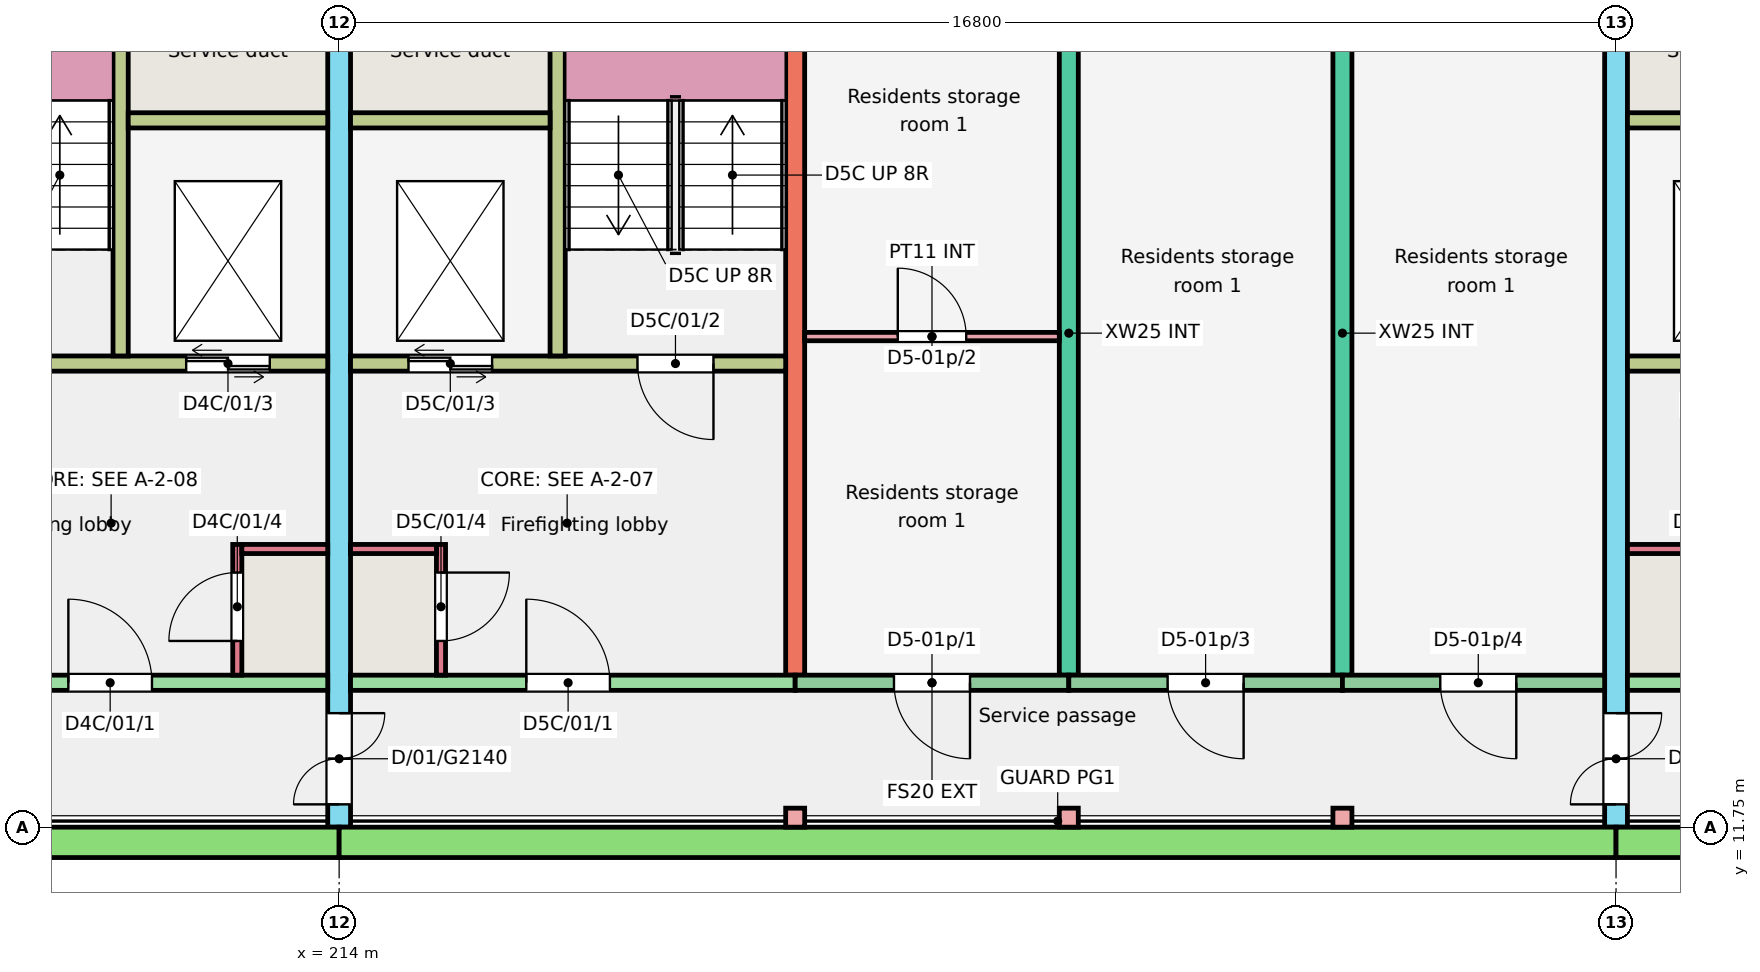
"""IFC4 building model, lengths in metres.
Left out: names, types, materials, properties, quantities, classifications, styles, units other than length and angle.
Written with IfcOpenShell. Run it as: python <this file> out.ifc"""

import sys

from ifc_helpers import new_model, si_unit, direction, frame, frame_2d, origin, origin_2d, place, context, subcontext, project, spatial, rectangle, extrude, element, fill, save


model = new_model("IFC4")
c1 = context("Model", 3, precision=1e-05, world=origin(), true_north=direction((0.0, 1.0)))
c2 = subcontext(c1, "Body", "Model", "MODEL_VIEW")
j1 = project(units=[si_unit("LENGTHUNIT", "METRE"), si_unit("PLANEANGLEUNIT", "RADIAN")], contexts=[c1])
p1 = place(None, origin())
s1 = spatial("IfcSite", under=j1, at=p1, CompositionType="ELEMENT")
p2 = place(p1, origin())
s2 = spatial("IfcBuilding", under=s1, at=p2, CompositionType="ELEMENT")
p3 = place(p2, frame((0.0, 0.0, 3.0)))
s3 = spatial("IfcBuildingStorey", under=s2, at=p3, CompositionType="ELEMENT", Elevation=3.0)
p4 = place(p3, frame((214.0, 11.75, 0.0), z_axis=(0.0, 0.0, 1.0), x_axis=(0.0, 1.0, 0.0)))
e1 = element("IfcWall", 1, at=p4, inside=s3, PredefinedType="SHEAR", context=c2, shape_type="SweptSolid", body=[
    extrude(rectangle(XDim=11.0, YDim=0.3, at=frame_2d((5.5, 0.0))), origin(), (0.0, 0.0, 1.0), 3.0),
])
p5 = place(p4, frame((0.3, 0.0, 0.0)))
e2 = element("IfcOpeningElement", 2, at=p5, cuts=e1, PredefinedType="OPENING", context=c2, shape_type="SweptSolid", body=[
    extrude(rectangle(XDim=1.2, YDim=2.1, at=frame_2d((0.6, 1.05))), frame((0.0, 0.16, 0.0), z_axis=(0.0, -1.0, 0.0), x_axis=(1.0, 0.0, 0.0)), (0.0, 0.0, 1.0), 0.32),
])
for number, where, z_axis, x_axis in (
    (3, (220.0, 13.75, 0.0), (0.0, 0.0, 1.0), (0.0, 1.0, 0.0)),
    (4, (223.6, 13.75, 0.0), (0.0, 0.0, 1.0), (0.0, 1.0, 0.0)),
    (5, (227.2, 13.75, 0.0), (0.0, 0.0, 1.0), (0.0, 1.0, 0.0)),
):
    element("IfcWall", number, at=place(p3, frame(where, z_axis=z_axis, x_axis=x_axis)), inside=s3, PredefinedType="SHEAR", context=c2, shape_type="SweptSolid", body=[
        extrude(rectangle(XDim=9.0, YDim=0.25, at=frame_2d((4.5, 0.0))), origin(), (0.0, 0.0, 1.0), 3.0),
    ])
p6 = place(p3, frame((230.8, 11.75, 0.0), z_axis=(0.0, 0.0, 1.0), x_axis=(0.0, 1.0, 0.0)))
e6 = element("IfcWall", 6, at=p6, inside=s3, PredefinedType="SHEAR", context=c2, shape_type="SweptSolid", body=[
    extrude(rectangle(XDim=11.0, YDim=0.3, at=frame_2d((5.5, 0.0))), origin(), (0.0, 0.0, 1.0), 3.0),
])
p7 = place(p6, frame((0.3, 0.0, 0.0)))
e7 = element("IfcOpeningElement", 7, at=p7, cuts=e6, PredefinedType="OPENING", context=c2, shape_type="SweptSolid", body=[
    extrude(rectangle(XDim=1.2, YDim=2.1, at=frame_2d((0.6, 1.05))), frame((0.0, 0.16, 0.0), z_axis=(0.0, -1.0, 0.0), x_axis=(1.0, 0.0, 0.0)), (0.0, 0.0, 1.0), 0.32),
])
p8 = place(p3, frame((208.0, 13.65, 0.0), z_axis=(0.0, 0.0, 1.0), x_axis=(1.0, 0.0, 0.0)))
e8 = element("IfcWall", 8, at=p8, inside=s3, PredefinedType="SHEAR", context=c2, shape_type="SweptSolid", body=[
    extrude(rectangle(XDim=5.85, YDim=0.2, at=frame_2d((2.925, 0.0))), origin(), (0.0, 0.0, 1.0), 3.0),
])
p9 = place(p8, frame((2.438, 0.0, 0.0)))
e9 = element("IfcOpeningElement", 9, at=p9, cuts=e8, PredefinedType="OPENING", context=c2, shape_type="SweptSolid", body=[
    extrude(rectangle(XDim=1.1, YDim=2.1, at=frame_2d((0.55, 1.05))), frame((0.0, 0.11, 0.0), z_axis=(0.0, -1.0, 0.0), x_axis=(1.0, 0.0, 0.0)), (0.0, 0.0, 1.0), 0.22),
])
p10 = place(p3, frame((208.125, 17.85, 0.0), z_axis=(0.0, 0.0, 1.0), x_axis=(1.0, 0.0, 0.0)))
e10 = element("IfcWall", 10, at=p10, inside=s3, PredefinedType="SHEAR", context=c2, shape_type="SweptSolid", body=[
    extrude(rectangle(XDim=5.725, YDim=0.2, at=frame_2d((2.863, 0.0))), origin(), (0.0, 0.0, 1.0), 3.0),
])
p11 = place(p10, frame((0.95, 0.0, 0.0)))
e11 = element("IfcOpeningElement", 11, at=p11, cuts=e10, PredefinedType="OPENING", context=c2, shape_type="SweptSolid", body=[
    extrude(rectangle(XDim=1.0, YDim=2.1, at=frame_2d((0.5, 1.05))), frame((0.0, 0.11, 0.0), z_axis=(0.0, -1.0, 0.0), x_axis=(1.0, 0.0, 0.0)), (0.0, 0.0, 1.0), 0.22),
])
p12 = place(p10, frame((3.863, 0.0, 0.0)))
e12 = element("IfcOpeningElement", 12, at=p12, cuts=e10, PredefinedType="OPENING", context=c2, shape_type="SweptSolid", body=[
    extrude(rectangle(XDim=1.1, YDim=2.1, at=frame_2d((0.55, 1.05))), frame((0.0, 0.11, 0.0), z_axis=(0.0, -1.0, 0.0), x_axis=(1.0, 0.0, 0.0)), (0.0, 0.0, 1.0), 0.22),
])
p13 = place(p3, frame((211.125, 17.95, 0.0), z_axis=(0.0, 0.0, 1.0), x_axis=(0.0, 1.0, 0.0)))
e13 = element("IfcWall", 13, at=p13, inside=s3, PredefinedType="SHEAR", context=c2, shape_type="SweptSolid", body=[
    extrude(rectangle(XDim=4.8, YDim=0.2, at=frame_2d((2.4, 0.0))), origin(), (0.0, 0.0, 1.0), 3.0),
])
p14 = place(p3, frame((211.225, 21.05, 0.0), z_axis=(0.0, 0.0, 1.0), x_axis=(1.0, 0.0, 0.0)))
e14 = element("IfcWall", 14, at=p14, inside=s3, PredefinedType="SHEAR", context=c2, shape_type="SweptSolid", body=[
    extrude(rectangle(XDim=2.625, YDim=0.2, at=frame_2d((1.312, 0.0))), origin(), (0.0, 0.0, 1.0), 3.0),
])
p15 = place(p3, frame((212.66, 13.75, 0.0), z_axis=(0.0, 0.0, 1.0), x_axis=(0.0, 1.0, 0.0)))
e15 = element("IfcWall", 15, at=p15, inside=s3, PredefinedType="SHEAR", context=c2, shape_type="SweptSolid", body=[
    extrude(rectangle(XDim=1.72, YDim=0.12, at=frame_2d((0.86, 0.0))), origin(), (0.0, 0.0, 1.0), 3.0),
])
p16 = place(p15, frame((0.45, 0.0, 0.0)))
e16 = element("IfcOpeningElement", 16, at=p16, cuts=e15, PredefinedType="OPENING", context=c2, shape_type="SweptSolid", body=[
    extrude(rectangle(XDim=0.9, YDim=2.1, at=frame_2d((0.45, 1.05))), frame((0.0, 0.07, 0.0), z_axis=(0.0, -1.0, 0.0), x_axis=(1.0, 0.0, 0.0)), (0.0, 0.0, 1.0), 0.14),
])
p17 = place(p3, frame((212.72, 15.41, 0.0), z_axis=(0.0, 0.0, 1.0), x_axis=(1.0, 0.0, 0.0)))
e17 = element("IfcWall", 17, at=p17, inside=s3, PredefinedType="SHEAR", context=c2, shape_type="SweptSolid", body=[
    extrude(rectangle(XDim=1.13, YDim=0.12, at=frame_2d((0.565, 0.0))), origin(), (0.0, 0.0, 1.0), 3.0),
])
p18 = place(p3, frame((214.15, 13.65, 0.0), z_axis=(0.0, 0.0, 1.0), x_axis=(1.0, 0.0, 0.0)))
e18 = element("IfcWall", 18, at=p18, inside=s3, PredefinedType="SHEAR", context=c2, shape_type="SweptSolid", body=[
    extrude(rectangle(XDim=5.85, YDim=0.2, at=frame_2d((2.925, 0.0))), origin(), (0.0, 0.0, 1.0), 3.0),
])
p19 = place(p18, frame((2.312, 0.0, 0.0)))
e19 = element("IfcOpeningElement", 19, at=p19, cuts=e18, PredefinedType="OPENING", context=c2, shape_type="SweptSolid", body=[
    extrude(rectangle(XDim=1.1, YDim=2.1, at=frame_2d((0.55, 1.05))), frame((0.0, 0.11, 0.0), z_axis=(0.0, -1.0, 0.0), x_axis=(1.0, 0.0, 0.0)), (0.0, 0.0, 1.0), 0.22),
])
p20 = place(p3, frame((214.15, 17.85, 0.0), z_axis=(0.0, 0.0, 1.0), x_axis=(1.0, 0.0, 0.0)))
e20 = element("IfcWall", 20, at=p20, inside=s3, PredefinedType="SHEAR", context=c2, shape_type="SweptSolid", body=[
    extrude(rectangle(XDim=5.725, YDim=0.2, at=frame_2d((2.863, 0.0))), origin(), (0.0, 0.0, 1.0), 3.0),
])
p21 = place(p20, frame((3.775, 0.0, 0.0)))
e21 = element("IfcOpeningElement", 21, at=p21, cuts=e20, PredefinedType="OPENING", context=c2, shape_type="SweptSolid", body=[
    extrude(rectangle(XDim=1.0, YDim=2.1, at=frame_2d((0.5, 1.05))), frame((0.0, 0.11, 0.0), z_axis=(0.0, -1.0, 0.0), x_axis=(1.0, 0.0, 0.0)), (0.0, 0.0, 1.0), 0.22),
])
p22 = place(p20, frame((0.762, 0.0, 0.0)))
e22 = element("IfcOpeningElement", 22, at=p22, cuts=e20, PredefinedType="OPENING", context=c2, shape_type="SweptSolid", body=[
    extrude(rectangle(XDim=1.1, YDim=2.1, at=frame_2d((0.55, 1.05))), frame((0.0, 0.11, 0.0), z_axis=(0.0, -1.0, 0.0), x_axis=(1.0, 0.0, 0.0)), (0.0, 0.0, 1.0), 0.22),
])
p23 = place(p3, frame((216.875, 17.95, 0.0), z_axis=(0.0, 0.0, 1.0), x_axis=(0.0, 1.0, 0.0)))
e23 = element("IfcWall", 23, at=p23, inside=s3, PredefinedType="SHEAR", context=c2, shape_type="SweptSolid", body=[
    extrude(rectangle(XDim=4.8, YDim=0.2, at=frame_2d((2.4, 0.0))), origin(), (0.0, 0.0, 1.0), 3.0),
])
p24 = place(p3, frame((214.15, 21.05, 0.0), z_axis=(0.0, 0.0, 1.0), x_axis=(1.0, 0.0, 0.0)))
e24 = element("IfcWall", 24, at=p24, inside=s3, PredefinedType="SHEAR", context=c2, shape_type="SweptSolid", body=[
    extrude(rectangle(XDim=2.625, YDim=0.2, at=frame_2d((1.312, 0.0))), origin(), (0.0, 0.0, 1.0), 3.0),
])
p25 = place(p3, frame((215.34, 13.75, 0.0), z_axis=(0.0, 0.0, 1.0), x_axis=(0.0, 1.0, 0.0)))
e25 = element("IfcWall", 25, at=p25, inside=s3, PredefinedType="SHEAR", context=c2, shape_type="SweptSolid", body=[
    extrude(rectangle(XDim=1.72, YDim=0.12, at=frame_2d((0.86, 0.0))), origin(), (0.0, 0.0, 1.0), 3.0),
])
p26 = place(p25, frame((0.45, 0.0, 0.0)))
e26 = element("IfcOpeningElement", 26, at=p26, cuts=e25, PredefinedType="OPENING", context=c2, shape_type="SweptSolid", body=[
    extrude(rectangle(XDim=0.9, YDim=2.1, at=frame_2d((0.45, 1.05))), frame((0.0, 0.07, 0.0), z_axis=(0.0, -1.0, 0.0), x_axis=(1.0, 0.0, 0.0)), (0.0, 0.0, 1.0), 0.14),
])
p27 = place(p3, frame((214.15, 15.41, 0.0), z_axis=(0.0, 0.0, 1.0), x_axis=(1.0, 0.0, 0.0)))
e27 = element("IfcWall", 27, at=p27, inside=s3, PredefinedType="SHEAR", context=c2, shape_type="SweptSolid", body=[
    extrude(rectangle(XDim=1.13, YDim=0.12, at=frame_2d((0.565, 0.0))), origin(), (0.0, 0.0, 1.0), 3.0),
])
p28 = place(p3, frame((220.0, 13.65, 0.0), z_axis=(0.0, 0.0, 1.0), x_axis=(1.0, 0.0, 0.0)))
e28 = element("IfcWall", 28, at=p28, inside=s3, PredefinedType="SOLIDWALL", context=c2, shape_type="SweptSolid", body=[
    extrude(rectangle(XDim=3.6, YDim=0.2, at=frame_2d((1.8, 0.0))), origin(), (0.0, 0.0, 1.0), 3.0),
])
p29 = place(p28, frame((1.3, 0.0, 0.0)))
e29 = element("IfcOpeningElement", 29, at=p29, cuts=e28, PredefinedType="OPENING", context=c2, shape_type="SweptSolid", body=[
    extrude(rectangle(XDim=1.0, YDim=2.1, at=frame_2d((0.5, 1.05))), frame((0.0, 0.11, 0.0), z_axis=(0.0, -1.0, 0.0), x_axis=(1.0, 0.0, 0.0)), (0.0, 0.0, 1.0), 0.22),
])
p30 = place(p3, frame((223.6, 13.65, 0.0), z_axis=(0.0, 0.0, 1.0), x_axis=(1.0, 0.0, 0.0)))
e30 = element("IfcWall", 30, at=p30, inside=s3, PredefinedType="SOLIDWALL", context=c2, shape_type="SweptSolid", body=[
    extrude(rectangle(XDim=3.6, YDim=0.2, at=frame_2d((1.8, 0.0))), origin(), (0.0, 0.0, 1.0), 3.0),
])
p31 = place(p30, frame((1.3, 0.0, 0.0)))
e31 = element("IfcOpeningElement", 31, at=p31, cuts=e30, PredefinedType="OPENING", context=c2, shape_type="SweptSolid", body=[
    extrude(rectangle(XDim=1.0, YDim=2.1, at=frame_2d((0.5, 1.05))), frame((0.0, 0.11, 0.0), z_axis=(0.0, -1.0, 0.0), x_axis=(1.0, 0.0, 0.0)), (0.0, 0.0, 1.0), 0.22),
])
p32 = place(p3, frame((227.2, 13.65, 0.0), z_axis=(0.0, 0.0, 1.0), x_axis=(1.0, 0.0, 0.0)))
e32 = element("IfcWall", 32, at=p32, inside=s3, PredefinedType="SOLIDWALL", context=c2, shape_type="SweptSolid", body=[
    extrude(rectangle(XDim=3.45, YDim=0.2, at=frame_2d((1.725, 0.0))), origin(), (0.0, 0.0, 1.0), 3.0),
])
p33 = place(p32, frame((1.288, 0.0, 0.0)))
e33 = element("IfcOpeningElement", 33, at=p33, cuts=e32, PredefinedType="OPENING", context=c2, shape_type="SweptSolid", body=[
    extrude(rectangle(XDim=1.0, YDim=2.1, at=frame_2d((0.5, 1.05))), frame((0.0, 0.11, 0.0), z_axis=(0.0, -1.0, 0.0), x_axis=(1.0, 0.0, 0.0)), (0.0, 0.0, 1.0), 0.22),
])
p34 = place(p3, frame((230.95, 13.65, 0.0), z_axis=(0.0, 0.0, 1.0), x_axis=(1.0, 0.0, 0.0)))
e34 = element("IfcWall", 34, at=p34, inside=s3, PredefinedType="SHEAR", context=c2, shape_type="SweptSolid", body=[
    extrude(rectangle(XDim=5.85, YDim=0.2, at=frame_2d((2.925, 0.0))), origin(), (0.0, 0.0, 1.0), 3.0),
])
p35 = place(p34, frame((2.312, 0.0, 0.0)))
e35 = element("IfcOpeningElement", 35, at=p35, cuts=e34, PredefinedType="OPENING", context=c2, shape_type="SweptSolid", body=[
    extrude(rectangle(XDim=1.1, YDim=2.1, at=frame_2d((0.55, 1.05))), frame((0.0, 0.11, 0.0), z_axis=(0.0, -1.0, 0.0), x_axis=(1.0, 0.0, 0.0)), (0.0, 0.0, 1.0), 0.22),
])
p36 = place(p3, frame((230.95, 17.85, 0.0), z_axis=(0.0, 0.0, 1.0), x_axis=(1.0, 0.0, 0.0)))
e36 = element("IfcWall", 36, at=p36, inside=s3, PredefinedType="SHEAR", context=c2, shape_type="SweptSolid", body=[
    extrude(rectangle(XDim=5.725, YDim=0.2, at=frame_2d((2.863, 0.0))), origin(), (0.0, 0.0, 1.0), 3.0),
])
p37 = place(p36, frame((3.775, 0.0, 0.0)))
e37 = element("IfcOpeningElement", 37, at=p37, cuts=e36, PredefinedType="OPENING", context=c2, shape_type="SweptSolid", body=[
    extrude(rectangle(XDim=1.0, YDim=2.1, at=frame_2d((0.5, 1.05))), frame((0.0, 0.11, 0.0), z_axis=(0.0, -1.0, 0.0), x_axis=(1.0, 0.0, 0.0)), (0.0, 0.0, 1.0), 0.22),
])
p38 = place(p36, frame((0.762, 0.0, 0.0)))
e38 = element("IfcOpeningElement", 38, at=p38, cuts=e36, PredefinedType="OPENING", context=c2, shape_type="SweptSolid", body=[
    extrude(rectangle(XDim=1.1, YDim=2.1, at=frame_2d((0.55, 1.05))), frame((0.0, 0.11, 0.0), z_axis=(0.0, -1.0, 0.0), x_axis=(1.0, 0.0, 0.0)), (0.0, 0.0, 1.0), 0.22),
])
p39 = place(p3, frame((230.95, 21.05, 0.0), z_axis=(0.0, 0.0, 1.0), x_axis=(1.0, 0.0, 0.0)))
e39 = element("IfcWall", 39, at=p39, inside=s3, PredefinedType="SHEAR", context=c2, shape_type="SweptSolid", body=[
    extrude(rectangle(XDim=2.625, YDim=0.2, at=frame_2d((1.312, 0.0))), origin(), (0.0, 0.0, 1.0), 3.0),
])
p40 = place(p3, frame((230.95, 15.41, 0.0), z_axis=(0.0, 0.0, 1.0), x_axis=(1.0, 0.0, 0.0)))
e40 = element("IfcWall", 40, at=p40, inside=s3, PredefinedType="SHEAR", context=c2, shape_type="SweptSolid", body=[
    extrude(rectangle(XDim=1.13, YDim=0.12, at=frame_2d((0.565, 0.0))), origin(), (0.0, 0.0, 1.0), 3.0),
])
for number, where, z_axis, x_axis in (
    (41, (220.0, 11.875, 0.0), (0.0, 0.0, 1.0), (1.0, 0.0, 0.0)),
    (42, (223.6, 11.875, 0.0), (0.0, 0.0, 1.0), (1.0, 0.0, 0.0)),
    (43, (227.2, 11.875, 0.0), (0.0, 0.0, 1.0), (1.0, 0.0, 0.0)),
):
    element("IfcColumn", number, at=place(p3, frame(where, z_axis=z_axis, x_axis=x_axis)), inside=s3, PredefinedType="COLUMN", context=c2, shape_type="SweptSolid", body=[
        extrude(rectangle(XDim=0.25, YDim=0.25, at=origin_2d()), origin(), (0.0, 0.0, 1.0), 3.0),
    ])
for number, where, z_axis, x_axis in (
    (44, (197.2, 11.55, 0.0), (0.0, 0.0, 1.0), (1.0, 0.0, 0.0)),
    (45, (214.0, 11.55, 0.0), (0.0, 0.0, 1.0), (1.0, 0.0, 0.0)),
    (46, (230.8, 11.55, 0.0), (0.0, 0.0, 1.0), (1.0, 0.0, 0.0)),
):
    element("IfcWall", number, at=place(p3, frame(where, z_axis=z_axis, x_axis=x_axis)), inside=s3, PredefinedType="SOLIDWALL", context=c2, shape_type="SweptSolid", body=[
        extrude(rectangle(XDim=16.8, YDim=0.4, at=frame_2d((8.4, 0.0))), origin(), (0.0, 0.0, 1.0), 2.85),
    ])
p41 = place(p3, frame((220.125, 18.205, 0.0), z_axis=(0.0, 0.0, 1.0), x_axis=(1.0, 0.0, 0.0)))
e47 = element("IfcWall", 47, at=p41, inside=s3, PredefinedType="PARTITIONING", context=c2, shape_type="SweptSolid", body=[
    extrude(rectangle(XDim=3.35, YDim=0.11, at=frame_2d((1.675, 0.0))), origin(), (0.0, 0.0, 1.0), 2.8),
])
p42 = place(p41, frame((1.225, 0.0, 0.0)))
e48 = element("IfcOpeningElement", 48, at=p42, cuts=e47, PredefinedType="OPENING", context=c2, shape_type="SweptSolid", body=[
    extrude(rectangle(XDim=0.9, YDim=2.1, at=frame_2d((0.45, 1.05))), frame((0.0, 0.065, 0.0), z_axis=(0.0, -1.0, 0.0), x_axis=(1.0, 0.0, 0.0)), (0.0, 0.0, 1.0), 0.13),
])
p43 = place(p29, origin())
e49 = element("IfcDoor", 49, at=p43, inside=s3, OperationType="SINGLE_SWING_RIGHT", PredefinedType="DOOR", context=c2, shape_type="SweptSolid", body=[
    extrude(rectangle(XDim=1.0, YDim=2.1, at=frame_2d((0.5, 1.05))), frame((0.0, 0.025, 0.0), z_axis=(0.0, -1.0, 0.0), x_axis=(1.0, 0.0, 0.0)), (0.0, 0.0, 1.0), 0.05),
])
fill(e29, e49)
p44 = place(p42, origin())
e50 = element("IfcDoor", 50, at=p44, inside=s3, OperationType="SINGLE_SWING_LEFT", PredefinedType="DOOR", context=c2, shape_type="SweptSolid", body=[
    extrude(rectangle(XDim=0.9, YDim=2.1, at=frame_2d((0.45, 1.05))), frame((0.0, 0.025, 0.0), z_axis=(0.0, -1.0, 0.0), x_axis=(1.0, 0.0, 0.0)), (0.0, 0.0, 1.0), 0.05),
])
fill(e48, e50)
p45 = place(p31, origin())
e51 = element("IfcDoor", 51, at=p45, inside=s3, OperationType="SINGLE_SWING_RIGHT", PredefinedType="DOOR", context=c2, shape_type="SweptSolid", body=[
    extrude(rectangle(XDim=1.0, YDim=2.1, at=frame_2d((0.5, 1.05))), frame((0.0, 0.025, 0.0), z_axis=(0.0, -1.0, 0.0), x_axis=(1.0, 0.0, 0.0)), (0.0, 0.0, 1.0), 0.05),
])
fill(e31, e51)
p46 = place(p33, origin())
e52 = element("IfcDoor", 52, at=p46, inside=s3, OperationType="SINGLE_SWING_RIGHT", PredefinedType="DOOR", context=c2, shape_type="SweptSolid", body=[
    extrude(rectangle(XDim=1.0, YDim=2.1, at=frame_2d((0.5, 1.05))), frame((0.0, 0.025, 0.0), z_axis=(0.0, -1.0, 0.0), x_axis=(1.0, 0.0, 0.0)), (0.0, 0.0, 1.0), 0.05),
])
fill(e33, e52)
p47 = place(p9, origin())
e53 = element("IfcDoor", 53, at=p47, inside=s3, OperationType="SINGLE_SWING_LEFT", PredefinedType="DOOR", context=c2, shape_type="SweptSolid", body=[
    extrude(rectangle(XDim=1.1, YDim=2.1, at=frame_2d((0.55, 1.05))), frame((0.0, 0.025, 0.0), z_axis=(0.0, -1.0, 0.0), x_axis=(1.0, 0.0, 0.0)), (0.0, 0.0, 1.0), 0.05),
])
fill(e9, e53)
p48 = place(p12, origin())
e54 = element("IfcDoor", 54, at=p48, inside=s3, OperationType="DOUBLE_DOOR_SLIDING", PredefinedType="DOOR", context=c2, shape_type="SweptSolid", body=[
    extrude(rectangle(XDim=1.1, YDim=2.1, at=frame_2d((0.55, 1.05))), frame((0.0, 0.025, 0.0), z_axis=(0.0, -1.0, 0.0), x_axis=(1.0, 0.0, 0.0)), (0.0, 0.0, 1.0), 0.05),
])
fill(e12, e54)
p49 = place(p16, origin())
e55 = element("IfcDoor", 55, at=p49, inside=s3, OperationType="SINGLE_SWING_LEFT", PredefinedType="DOOR", context=c2, shape_type="SweptSolid", body=[
    extrude(rectangle(XDim=0.9, YDim=2.1, at=frame_2d((0.45, 1.05))), frame((0.0, 0.025, 0.0), z_axis=(0.0, -1.0, 0.0), x_axis=(1.0, 0.0, 0.0)), (0.0, 0.0, 1.0), 0.05),
])
fill(e16, e55)
p50 = place(p19, origin())
e56 = element("IfcDoor", 56, at=p50, inside=s3, OperationType="SINGLE_SWING_LEFT", PredefinedType="DOOR", context=c2, shape_type="SweptSolid", body=[
    extrude(rectangle(XDim=1.1, YDim=2.1, at=frame_2d((0.55, 1.05))), frame((0.0, 0.025, 0.0), z_axis=(0.0, -1.0, 0.0), x_axis=(1.0, 0.0, 0.0)), (0.0, 0.0, 1.0), 0.05),
])
fill(e19, e56)
p51 = place(p21, origin())
e57 = element("IfcDoor", 57, at=p51, inside=s3, OperationType="SINGLE_SWING_RIGHT", PredefinedType="DOOR", context=c2, shape_type="SweptSolid", body=[
    extrude(rectangle(XDim=1.0, YDim=2.1, at=frame_2d((0.5, 1.05))), frame((0.0, 0.025, 0.0), z_axis=(0.0, -1.0, 0.0), x_axis=(1.0, 0.0, 0.0)), (0.0, 0.0, 1.0), 0.05),
])
fill(e21, e57)
p52 = place(p22, origin())
e58 = element("IfcDoor", 58, at=p52, inside=s3, OperationType="DOUBLE_DOOR_SLIDING", PredefinedType="DOOR", context=c2, shape_type="SweptSolid", body=[
    extrude(rectangle(XDim=1.1, YDim=2.1, at=frame_2d((0.55, 1.05))), frame((0.0, 0.025, 0.0), z_axis=(0.0, -1.0, 0.0), x_axis=(1.0, 0.0, 0.0)), (0.0, 0.0, 1.0), 0.05),
])
fill(e22, e58)
p53 = place(p26, origin())
e59 = element("IfcDoor", 59, at=p53, inside=s3, OperationType="SINGLE_SWING_RIGHT", PredefinedType="DOOR", context=c2, shape_type="SweptSolid", body=[
    extrude(rectangle(XDim=0.9, YDim=2.1, at=frame_2d((0.45, 1.05))), frame((0.0, 0.025, 0.0), z_axis=(0.0, -1.0, 0.0), x_axis=(1.0, 0.0, 0.0)), (0.0, 0.0, 1.0), 0.05),
])
fill(e26, e59)
p54 = place(p5, origin())
e60 = element("IfcDoor", 60, at=p54, inside=s3, OperationType="DOUBLE_DOOR_SINGLE_SWING", PredefinedType="DOOR", context=c2, shape_type="SweptSolid", body=[
    extrude(rectangle(XDim=1.2, YDim=2.1, at=frame_2d((0.6, 1.05))), frame((0.0, 0.025, 0.0), z_axis=(0.0, -1.0, 0.0), x_axis=(1.0, 0.0, 0.0)), (0.0, 0.0, 1.0), 0.05),
])
fill(e2, e60)
p55 = place(p7, origin())
e61 = element("IfcDoor", 61, at=p55, inside=s3, OperationType="DOUBLE_DOOR_SINGLE_SWING", PredefinedType="DOOR", context=c2, shape_type="SweptSolid", body=[
    extrude(rectangle(XDim=1.2, YDim=2.1, at=frame_2d((0.6, 1.05))), frame((0.0, 0.025, 0.0), z_axis=(0.0, -1.0, 0.0), x_axis=(1.0, 0.0, 0.0)), (0.0, 0.0, 1.0), 0.05),
])
fill(e7, e61)
save(model, sys.argv[1])
